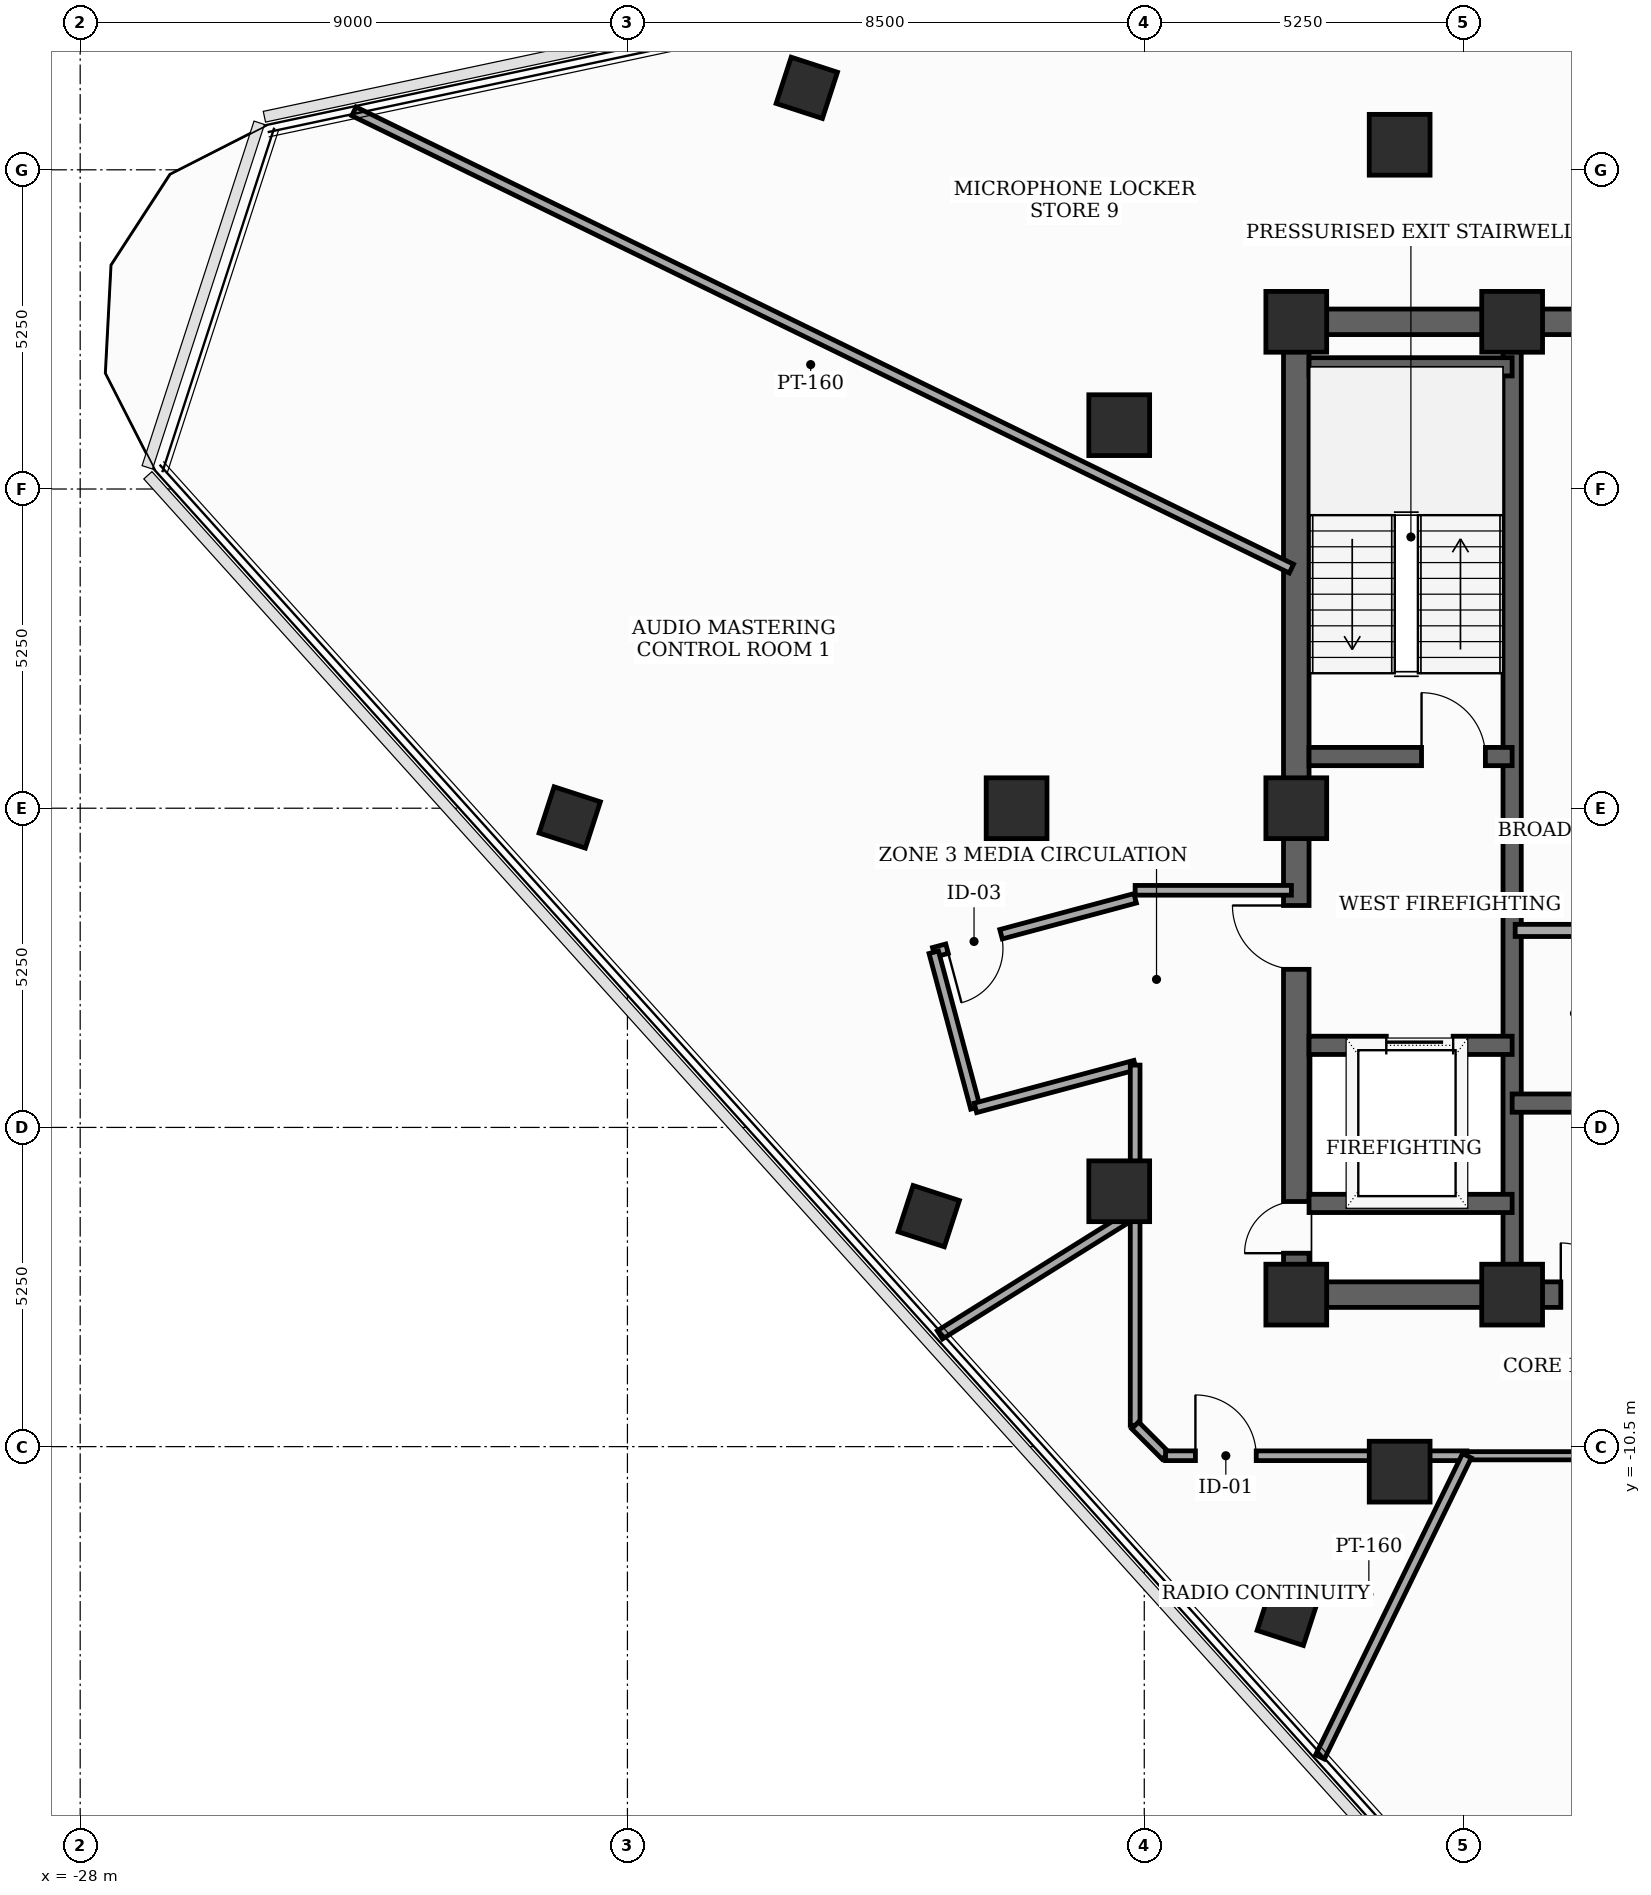
"""IFC4 building model, lengths in metres.
Left out: names, types, materials, properties, quantities, classifications, styles, units other than length and angle.
Written with IfcOpenShell. Run it as: python <this file> out.ifc"""

import sys

from ifc_helpers import new_model, si_unit, direction, frame, frame_2d, origin, origin_2d, place, context, subcontext, project, spatial, rectangle, extrude, element, fill, save


model = new_model("IFC4")
c1 = context("Model", 3, precision=1e-05, world=origin(), true_north=direction((0.0, 1.0)))
c2 = subcontext(c1, "Body", "Model", "MODEL_VIEW")
j1 = project(units=[si_unit("LENGTHUNIT", "METRE"), si_unit("PLANEANGLEUNIT", "RADIAN")], contexts=[c1])
p1 = place(None, origin())
s1 = spatial("IfcSite", under=j1, at=p1, CompositionType="ELEMENT")
p2 = place(p1, origin())
s2 = spatial("IfcBuilding", under=s1, at=p2, CompositionType="ELEMENT")
p3 = place(p2, frame((0.0, 0.0, 309.1)))
s3 = spatial("IfcBuildingStorey", under=s2, at=p3, CompositionType="ELEMENT", Elevation=309.1)
for number, where, z_axis, x_axis in (
    (1, (-8.0, -8.0, 0.0), (0.0, 0.0, 1.0), (1.0, 0.0, 0.0)),
    (2, (-4.45, -8.0, 0.0), (0.0, 0.0, 1.0), (1.0, 0.0, 0.0)),
    (3, (-4.45, 8.0, 0.0), (0.0, 0.0, 1.0), (1.0, 0.0, 0.0)),
    (4, (-8.0, 8.0, 0.0), (0.0, 0.0, 1.0), (1.0, 0.0, 0.0)),
    (5, (-8.0, 0.0, 0.0), (0.0, 0.0, 1.0), (1.0, 0.0, 0.0)),
    (6, (-6.3, 10.912, 0.0), (0.0, 0.0, 1.0), (1.0, 0.0, 0.0)),
    (7, (-10.912, 6.3, 0.0), (0.0, 0.0, 1.0), (1.0, 0.0, 0.0)),
    (8, (-12.6, 0.0, 0.0), (0.0, 0.0, 1.0), (1.0, 0.0, 0.0)),
    (9, (-10.912, -6.3, 0.0), (0.0, 0.0, 1.0), (1.0, 0.0, 0.0)),
    (10, (-6.3, -10.912, 0.0), (0.0, 0.0, 1.0), (1.0, 0.0, 0.0)),
):
    element("IfcColumn", number, at=place(p3, frame(where, z_axis=z_axis, x_axis=x_axis)), inside=s3, PredefinedType="COLUMN", context=c2, shape_type="SweptSolid", body=[
        extrude(rectangle(XDim=1.0, YDim=1.0, at=origin_2d()), origin(), (0.0, 0.0, 1.0), 3.7),
    ])
for number, where, z_axis, x_axis in (
    (11, (-16.05, 11.848, 0.0), (0.0, 0.0, 1.0), (0.309, 0.951, 0.0)),
    (12, (-19.949, -0.151, 0.0), (0.0, 0.0, 1.0), (0.309, 0.951, 0.0)),
    (13, (-14.045, -6.709, 0.0), (0.0, 0.0, 1.0), (0.309, 0.951, 0.0)),
    (14, (-8.14, -13.266, 0.0), (0.0, 0.0, 1.0), (0.309, 0.951, 0.0)),
):
    element("IfcColumn", number, at=place(p3, frame(where, z_axis=z_axis, x_axis=x_axis)), inside=s3, PredefinedType="COLUMN", context=c2, shape_type="SweptSolid", body=[
        extrude(rectangle(XDim=0.8, YDim=0.8, at=origin_2d()), origin(), (0.0, 0.0, 1.0), 3.7),
    ])
p4 = place(p3, frame((-8.0, -8.0, 0.0), z_axis=(0.0, 0.0, 1.0), x_axis=(0.0, 1.0, 0.0)))
e15 = element("IfcWall", 15, at=p4, inside=s3, PredefinedType="SHEAR", context=c2, shape_type="SweptSolid", body=[
    extrude(rectangle(XDim=16.0, YDim=0.42, at=frame_2d((8.0, 0.0))), origin(), (0.0, 0.0, 1.0), 3.44),
])
p5 = place(p4, frame((0.681, 0.0, 0.0)))
e16 = element("IfcOpeningElement", 16, at=p5, cuts=e15, PredefinedType="OPENING", context=c2, shape_type="SweptSolid", body=[
    extrude(rectangle(XDim=0.85, YDim=2.02, at=frame_2d((0.425, 1.01))), frame((0.0, 0.22, 0.0), z_axis=(0.0, -1.0, 0.0), x_axis=(1.0, 0.0, 0.0)), (0.0, 0.0, 1.0), 0.44),
])
p6 = place(p4, frame((5.35, 0.0, 0.0)))
e17 = element("IfcOpeningElement", 17, at=p6, cuts=e15, PredefinedType="OPENING", context=c2, shape_type="SweptSolid", body=[
    extrude(rectangle(XDim=1.05, YDim=2.15, at=frame_2d((0.525, 1.075))), frame((0.0, 0.22, 0.0), z_axis=(0.0, -1.0, 0.0), x_axis=(1.0, 0.0, 0.0)), (0.0, 0.0, 1.0), 0.44),
])
p7 = place(p3, frame((-8.0, -8.0, 0.0), z_axis=(0.0, 0.0, 1.0), x_axis=(1.0, 0.0, 0.0)))
e18 = element("IfcWall", 18, at=p7, inside=s3, PredefinedType="SHEAR", context=c2, shape_type="SweptSolid", body=[
    extrude(rectangle(XDim=16.0, YDim=0.42, at=frame_2d((8.0, 0.0))), origin(), (0.0, 0.0, 1.0), 3.44),
])
p8 = place(p7, frame((4.35, 0.0, 0.0)))
e19 = element("IfcOpeningElement", 19, at=p8, cuts=e18, PredefinedType="OPENING", context=c2, shape_type="SweptSolid", body=[
    extrude(rectangle(XDim=0.85, YDim=2.02, at=frame_2d((0.425, 1.01))), frame((0.0, 0.22, 0.0), z_axis=(0.0, -1.0, 0.0), x_axis=(1.0, 0.0, 0.0)), (0.0, 0.0, 1.0), 0.44),
])
p9 = place(p7, frame((6.49, 0.0, 0.0)))
e20 = element("IfcOpeningElement", 20, at=p9, cuts=e18, PredefinedType="OPENING", context=c2, shape_type="SweptSolid", body=[
    extrude(rectangle(XDim=0.85, YDim=2.02, at=frame_2d((0.425, 1.01))), frame((0.0, 0.22, 0.0), z_axis=(0.0, -1.0, 0.0), x_axis=(1.0, 0.0, 0.0)), (0.0, 0.0, 1.0), 0.44),
])
p10 = place(p7, frame((8.69, 0.0, 0.0)))
e21 = element("IfcOpeningElement", 21, at=p10, cuts=e18, PredefinedType="OPENING", context=c2, shape_type="SweptSolid", body=[
    extrude(rectangle(XDim=0.85, YDim=2.02, at=frame_2d((0.425, 1.01))), frame((0.0, 0.22, 0.0), z_axis=(0.0, -1.0, 0.0), x_axis=(1.0, 0.0, 0.0)), (0.0, 0.0, 1.0), 0.44),
])
p11 = place(p7, frame((10.8, 0.0, 0.0)))
e22 = element("IfcOpeningElement", 22, at=p11, cuts=e18, PredefinedType="OPENING", context=c2, shape_type="SweptSolid", body=[
    extrude(rectangle(XDim=0.85, YDim=2.02, at=frame_2d((0.425, 1.01))), frame((0.0, 0.22, 0.0), z_axis=(0.0, -1.0, 0.0), x_axis=(1.0, 0.0, 0.0)), (0.0, 0.0, 1.0), 0.44),
])
p12 = place(p3, frame((-8.0, 8.0, 0.0), z_axis=(0.0, 0.0, 1.0), x_axis=(1.0, 0.0, 0.0)))
e23 = element("IfcWall", 23, at=p12, inside=s3, PredefinedType="SHEAR", context=c2, shape_type="SweptSolid", body=[
    extrude(rectangle(XDim=16.0, YDim=0.42, at=frame_2d((8.0, 0.0))), origin(), (0.0, 0.0, 1.0), 3.44),
])
p13 = place(p12, frame((7.1, 0.0, 0.0)))
e24 = element("IfcOpeningElement", 24, at=p13, cuts=e23, PredefinedType="OPENING", context=c2, shape_type="SweptSolid", body=[
    extrude(rectangle(XDim=1.8, YDim=2.15, at=frame_2d((0.9, 1.075))), frame((0.0, 0.22, 0.0), z_axis=(0.0, -1.0, 0.0), x_axis=(1.0, 0.0, 0.0)), (0.0, 0.0, 1.0), 0.44),
])
p14 = place(p3, frame((-4.45, -7.79, 0.0), z_axis=(0.0, 0.0, 1.0), x_axis=(0.0, 1.0, 0.0)))
e25 = element("IfcWall", 25, at=p14, inside=s3, PredefinedType="SHEAR", context=c2, shape_type="SweptSolid", body=[
    extrude(rectangle(XDim=15.58, YDim=0.3, at=frame_2d((7.79, 0.0))), origin(), (0.0, 0.0, 1.0), 3.44),
])
p15 = place(p3, frame((-7.79, 0.85, 0.0), z_axis=(0.0, 0.0, 1.0), x_axis=(1.0, 0.0, 0.0)))
e26 = element("IfcWall", 26, at=p15, inside=s3, PredefinedType="SHEAR", context=c2, shape_type="SweptSolid", body=[
    extrude(rectangle(XDim=3.34, YDim=0.3, at=frame_2d((1.67, 0.0))), origin(), (0.0, 0.0, 1.0), 3.44),
])
p16 = place(p15, frame((1.85, 0.0, 0.0)))
e27 = element("IfcOpeningElement", 27, at=p16, cuts=e26, PredefinedType="OPENING", context=c2, shape_type="SweptSolid", body=[
    extrude(rectangle(XDim=1.05, YDim=2.15, at=frame_2d((0.525, 1.075))), frame((0.0, 0.16, 0.0), z_axis=(0.0, -1.0, 0.0), x_axis=(1.0, 0.0, 0.0)), (0.0, 0.0, 1.0), 0.32),
])
p17 = place(p3, frame((-7.79, 7.26, 0.0), z_axis=(0.0, 0.0, 1.0), x_axis=(1.0, 0.0, 0.0)))
e28 = element("IfcWall", 28, at=p17, inside=s3, PredefinedType="SHEAR", context=c2, shape_type="SweptSolid", body=[
    extrude(rectangle(XDim=3.34, YDim=0.3, at=frame_2d((1.67, 0.0))), origin(), (0.0, 0.0, 1.0), 3.44),
])
p18 = place(p3, frame((-7.79, -3.9, 0.0), z_axis=(0.0, 0.0, 1.0), x_axis=(1.0, 0.0, 0.0)))
e29 = element("IfcWall", 29, at=p18, inside=s3, PredefinedType="SHEAR", context=c2, shape_type="SweptSolid", body=[
    extrude(rectangle(XDim=3.34, YDim=0.3, at=frame_2d((1.67, 0.0))), origin(), (0.0, 0.0, 1.0), 3.44),
])
p19 = place(p18, frame((1.27, 0.0, 0.0)))
e30 = element("IfcOpeningElement", 30, at=p19, cuts=e29, PredefinedType="OPENING", context=c2, shape_type="SweptSolid", body=[
    extrude(rectangle(XDim=1.1, YDim=2.1, at=frame_2d((0.55, 1.05))), frame((0.0, 0.16, 0.0), z_axis=(0.0, -1.0, 0.0), x_axis=(1.0, 0.0, 0.0)), (0.0, 0.0, 1.0), 0.32),
])
p20 = place(p3, frame((-7.79, -6.5, 0.0), z_axis=(0.0, 0.0, 1.0), x_axis=(1.0, 0.0, 0.0)))
e31 = element("IfcWall", 31, at=p20, inside=s3, PredefinedType="SHEAR", context=c2, shape_type="SweptSolid", body=[
    extrude(rectangle(XDim=3.34, YDim=0.3, at=frame_2d((1.67, 0.0))), origin(), (0.0, 0.0, 1.0), 3.44),
])
p21 = place(p3, frame((-4.45, -4.85, 0.0), z_axis=(0.0, 0.0, 1.0), x_axis=(1.0, 0.0, 0.0)))
e32 = element("IfcWall", 32, at=p21, inside=s3, PredefinedType="SHEAR", context=c2, shape_type="SweptSolid", body=[
    extrude(rectangle(XDim=8.9, YDim=0.3, at=frame_2d((4.45, 0.0))), origin(), (0.0, 0.0, 1.0), 3.44),
])
p22 = place(p3, frame((-4.4, -2.01, 0.0), z_axis=(0.0, 0.0, 1.0), x_axis=(1.0, 0.0, 0.0)))
e33 = element("IfcWall", 33, at=p22, inside=s3, PredefinedType="SOLIDWALL", context=c2, shape_type="SweptSolid", body=[
    extrude(rectangle(XDim=2.68, YDim=0.2, at=frame_2d((1.34, 0.0))), origin(), (0.0, 0.0, 1.0), 3.44),
])
p23 = place(p3, frame((-8.08, -1.35, 0.0), z_axis=(0.0, 0.0, 1.0), x_axis=(-1.0, 0.0, 0.0)))
e34 = element("IfcWall", 34, at=p23, inside=s3, PredefinedType="PARTITIONING", context=c2, shape_type="SweptSolid", body=[
    extrude(rectangle(XDim=2.57, YDim=0.16, at=frame_2d((1.285, 0.0))), origin(), (0.0, 0.0, 1.0), 2.04),
])
p24 = place(p3, frame((-10.65, -1.482, 0.0), z_axis=(0.0, 0.0, 1.0), x_axis=(-0.965961397105, -0.2586862565, 0.0)))
e35 = element("IfcWall", 35, at=p24, inside=s3, PredefinedType="PARTITIONING", context=c2, shape_type="SweptSolid", body=[
    extrude(rectangle(XDim=3.429, YDim=0.16, at=frame_2d((1.714, 0.0))), origin(), (0.0, 0.0, 1.0), 2.04),
])
p25 = place(p24, frame((2.283, 0.0, 0.0)))
e36 = element("IfcOpeningElement", 36, at=p25, cuts=e35, PredefinedType="OPENING", context=c2, shape_type="SweptSolid", body=[
    extrude(rectangle(XDim=0.92, YDim=2.0, at=frame_2d((0.46, 1.0))), frame((0.0, 0.09, 0.0), z_axis=(0.0, -1.0, 0.0), x_axis=(1.0, 0.0, 0.0)), (0.0, 0.0, 1.0), 0.18),
])
p26 = place(p3, frame((-13.962, -2.369, 0.0), z_axis=(0.0, 0.0, 1.0), x_axis=(0.258413725385, -0.966034340245, 0.0)))
e37 = element("IfcWall", 37, at=p26, inside=s3, PredefinedType="PARTITIONING", context=c2, shape_type="SweptSolid", body=[
    extrude(rectangle(XDim=2.65, YDim=0.16, at=frame_2d((1.325, 0.0))), origin(), (0.0, 0.0, 1.0), 2.04),
])
p27 = place(p3, frame((-13.277, -4.929, 0.0), z_axis=(0.0, 0.0, 1.0), x_axis=(0.965934830229, 0.258785439601, 0.0)))
e38 = element("IfcWall", 38, at=p27, inside=s3, PredefinedType="PARTITIONING", context=c2, shape_type="SweptSolid", body=[
    extrude(rectangle(XDim=2.72, YDim=0.16, at=frame_2d((1.36, 0.0))), origin(), (0.0, 0.0, 1.0), 2.04),
])
p28 = place(p3, frame((-10.65, -4.225, 0.0), z_axis=(0.0, 0.0, 1.0), x_axis=(0.0, -1.0, 0.0)))
e39 = element("IfcWall", 39, at=p28, inside=s3, PredefinedType="PARTITIONING", context=c2, shape_type="SweptSolid", body=[
    extrude(rectangle(XDim=2.43, YDim=0.16, at=frame_2d((1.215, 0.0))), origin(), (0.0, 0.0, 1.0), 2.04),
])
p29 = place(p3, frame((-10.65, -6.655, 0.0), z_axis=(0.0, 0.0, 1.0), x_axis=(0.0, -1.0, 0.0)))
e40 = element("IfcWall", 40, at=p29, inside=s3, PredefinedType="PARTITIONING", context=c2, shape_type="SweptSolid", body=[
    extrude(rectangle(XDim=3.495, YDim=0.16, at=frame_2d((1.748, 0.0))), origin(), (0.0, 0.0, 1.0), 2.04),
])
p30 = place(p3, frame((-10.65, -10.15, 0.0), z_axis=(0.0, 0.0, 1.0), x_axis=(0.707106781187, -0.707106781187, 0.0)))
e41 = element("IfcWall", 41, at=p30, inside=s3, PredefinedType="PARTITIONING", context=c2, shape_type="SweptSolid", body=[
    extrude(rectangle(XDim=0.707, YDim=0.16, at=frame_2d((0.354, 0.0))), origin(), (0.0, 0.0, 1.0), 2.03),
])
p31 = place(p3, frame((-10.15, -10.65, 0.0), z_axis=(0.0, 0.0, 1.0), x_axis=(1.0, 0.0, 0.0)))
e42 = element("IfcWall", 42, at=p31, inside=s3, PredefinedType="PARTITIONING", context=c2, shape_type="SweptSolid", body=[
    extrude(rectangle(XDim=4.956, YDim=0.16, at=frame_2d((2.478, 0.0))), origin(), (0.0, 0.0, 1.0), 2.04),
])
p32 = place(p31, frame((0.491, 0.0, 0.0)))
e43 = element("IfcOpeningElement", 43, at=p32, cuts=e42, PredefinedType="OPENING", context=c2, shape_type="SweptSolid", body=[
    extrude(rectangle(XDim=1.0, YDim=2.0, at=frame_2d((0.5, 1.0))), frame((0.0, 0.09, 0.0), z_axis=(0.0, -1.0, 0.0), x_axis=(1.0, 0.0, 0.0)), (0.0, 0.0, 1.0), 0.18),
])
p33 = place(p3, frame((-5.194, -10.65, 0.0), z_axis=(0.0, 0.0, 1.0), x_axis=(1.0, 0.0, 0.0)))
e44 = element("IfcWall", 44, at=p33, inside=s3, PredefinedType="PARTITIONING", context=c2, shape_type="SweptSolid", body=[
    extrude(rectangle(XDim=7.458, YDim=0.135, at=frame_2d((3.729, 0.0))), origin(), (0.0, 0.0, 1.0), 2.04),
])
p34 = place(p33, frame((3.254, 0.0, 0.0)))
e45 = element("IfcOpeningElement", 45, at=p34, cuts=e44, PredefinedType="OPENING", context=c2, shape_type="SweptSolid", body=[
    extrude(rectangle(XDim=0.95, YDim=2.0, at=frame_2d((0.475, 1.0))), frame((0.0, 0.077, 0.0), z_axis=(0.0, -1.0, 0.0), x_axis=(1.0, 0.0, 0.0)), (0.0, 0.0, 1.0), 0.155),
])
p35 = place(p3, frame((-13.861, -8.661, 0.0), z_axis=(0.0, 0.0, 1.0), x_axis=(0.848074364393, 0.529877223948, 0.0)))
e46 = element("IfcWall", 46, at=p35, inside=s3, PredefinedType="PARTITIONING", context=c2, shape_type="SweptSolid", body=[
    extrude(rectangle(XDim=3.786, YDim=0.16, at=frame_2d((1.893, 0.0))), origin(), (0.0, 0.0, 1.0), 2.04),
])
p36 = place(p3, frame((-8.08, 3.941, 0.0), z_axis=(0.0, 0.0, 1.0), x_axis=(-0.898778840696, 0.438402321523, 0.0)))
e47 = element("IfcWall", 47, at=p36, inside=s3, PredefinedType="PARTITIONING", context=c2, shape_type="SweptSolid", body=[
    extrude(rectangle(XDim=17.154, YDim=0.16, at=frame_2d((8.577, 0.0))), origin(), (0.0, 0.0, 1.0), 2.04),
])
p37 = place(p3, frame((-7.61, -15.604, 0.0), z_axis=(0.0, 0.0, 1.0), x_axis=(0.438332870835, 0.898812713721, 0.0)))
e48 = element("IfcWall", 48, at=p37, inside=s3, PredefinedType="PARTITIONING", context=c2, shape_type="SweptSolid", body=[
    extrude(rectangle(XDim=5.512, YDim=0.16, at=frame_2d((2.756, 0.0))), origin(), (0.0, 0.0, 1.0), 2.04),
])
p38 = place(p5, origin())
e49 = element("IfcDoor", 49, at=p38, inside=s3, OperationType="SINGLE_SWING_LEFT", PredefinedType="TRAPDOOR", context=c2, shape_type="SweptSolid", body=[
    extrude(rectangle(XDim=0.85, YDim=2.02, at=frame_2d((0.425, 1.01))), frame((0.0, 0.025, 0.0), z_axis=(0.0, -1.0, 0.0), x_axis=(1.0, 0.0, 0.0)), (0.0, 0.0, 1.0), 0.05),
])
fill(e16, e49)
p39 = place(p6, origin())
e50 = element("IfcDoor", 50, at=p39, inside=s3, OperationType="SINGLE_SWING_RIGHT", PredefinedType="DOOR", context=c2, shape_type="SweptSolid", body=[
    extrude(rectangle(XDim=1.05, YDim=2.15, at=frame_2d((0.525, 1.075))), frame((0.0, 0.025, 0.0), z_axis=(0.0, -1.0, 0.0), x_axis=(1.0, 0.0, 0.0)), (0.0, 0.0, 1.0), 0.05),
])
fill(e17, e50)
p40 = place(p8, origin())
e51 = element("IfcDoor", 51, at=p40, inside=s3, OperationType="SINGLE_SWING_LEFT", PredefinedType="TRAPDOOR", context=c2, shape_type="SweptSolid", body=[
    extrude(rectangle(XDim=0.85, YDim=2.02, at=frame_2d((0.425, 1.01))), frame((0.0, 0.025, 0.0), z_axis=(0.0, -1.0, 0.0), x_axis=(1.0, 0.0, 0.0)), (0.0, 0.0, 1.0), 0.05),
])
fill(e19, e51)
p41 = place(p16, origin())
e52 = element("IfcDoor", 52, at=p41, inside=s3, OperationType="SINGLE_SWING_LEFT", PredefinedType="DOOR", context=c2, shape_type="SweptSolid", body=[
    extrude(rectangle(XDim=1.05, YDim=2.15, at=frame_2d((0.525, 1.075))), frame((0.0, 0.025, 0.0), z_axis=(0.0, -1.0, 0.0), x_axis=(1.0, 0.0, 0.0)), (0.0, 0.0, 1.0), 0.05),
])
fill(e27, e52)
p42 = place(p19, origin())
e53 = element("IfcDoor", 53, at=p42, inside=s3, OperationType="SLIDING_TO_LEFT", PredefinedType="DOOR", context=c2, shape_type="SweptSolid", body=[
    extrude(rectangle(XDim=1.1, YDim=2.1, at=frame_2d((0.55, 1.05))), frame((0.0, 0.025, 0.0), z_axis=(0.0, -1.0, 0.0), x_axis=(1.0, 0.0, 0.0)), (0.0, 0.0, 1.0), 0.05),
])
fill(e30, e53)
p43 = place(p25, origin())
e54 = element("IfcDoor", 54, at=p43, inside=s3, OperationType="SINGLE_SWING_RIGHT", PredefinedType="DOOR", context=c2, shape_type="SweptSolid", body=[
    extrude(rectangle(XDim=0.92, YDim=2.0, at=frame_2d((0.46, 1.0))), frame((0.0, 0.025, 0.0), z_axis=(0.0, -1.0, 0.0), x_axis=(1.0, 0.0, 0.0)), (0.0, 0.0, 1.0), 0.05),
])
fill(e36, e54)
p44 = place(p32, origin())
e55 = element("IfcDoor", 55, at=p44, inside=s3, OperationType="SINGLE_SWING_LEFT", PredefinedType="DOOR", context=c2, shape_type="SweptSolid", body=[
    extrude(rectangle(XDim=1.0, YDim=2.0, at=frame_2d((0.5, 1.0))), frame((0.0, 0.025, 0.0), z_axis=(0.0, -1.0, 0.0), x_axis=(1.0, 0.0, 0.0)), (0.0, 0.0, 1.0), 0.05),
])
fill(e43, e55)
save(model, sys.argv[1])
